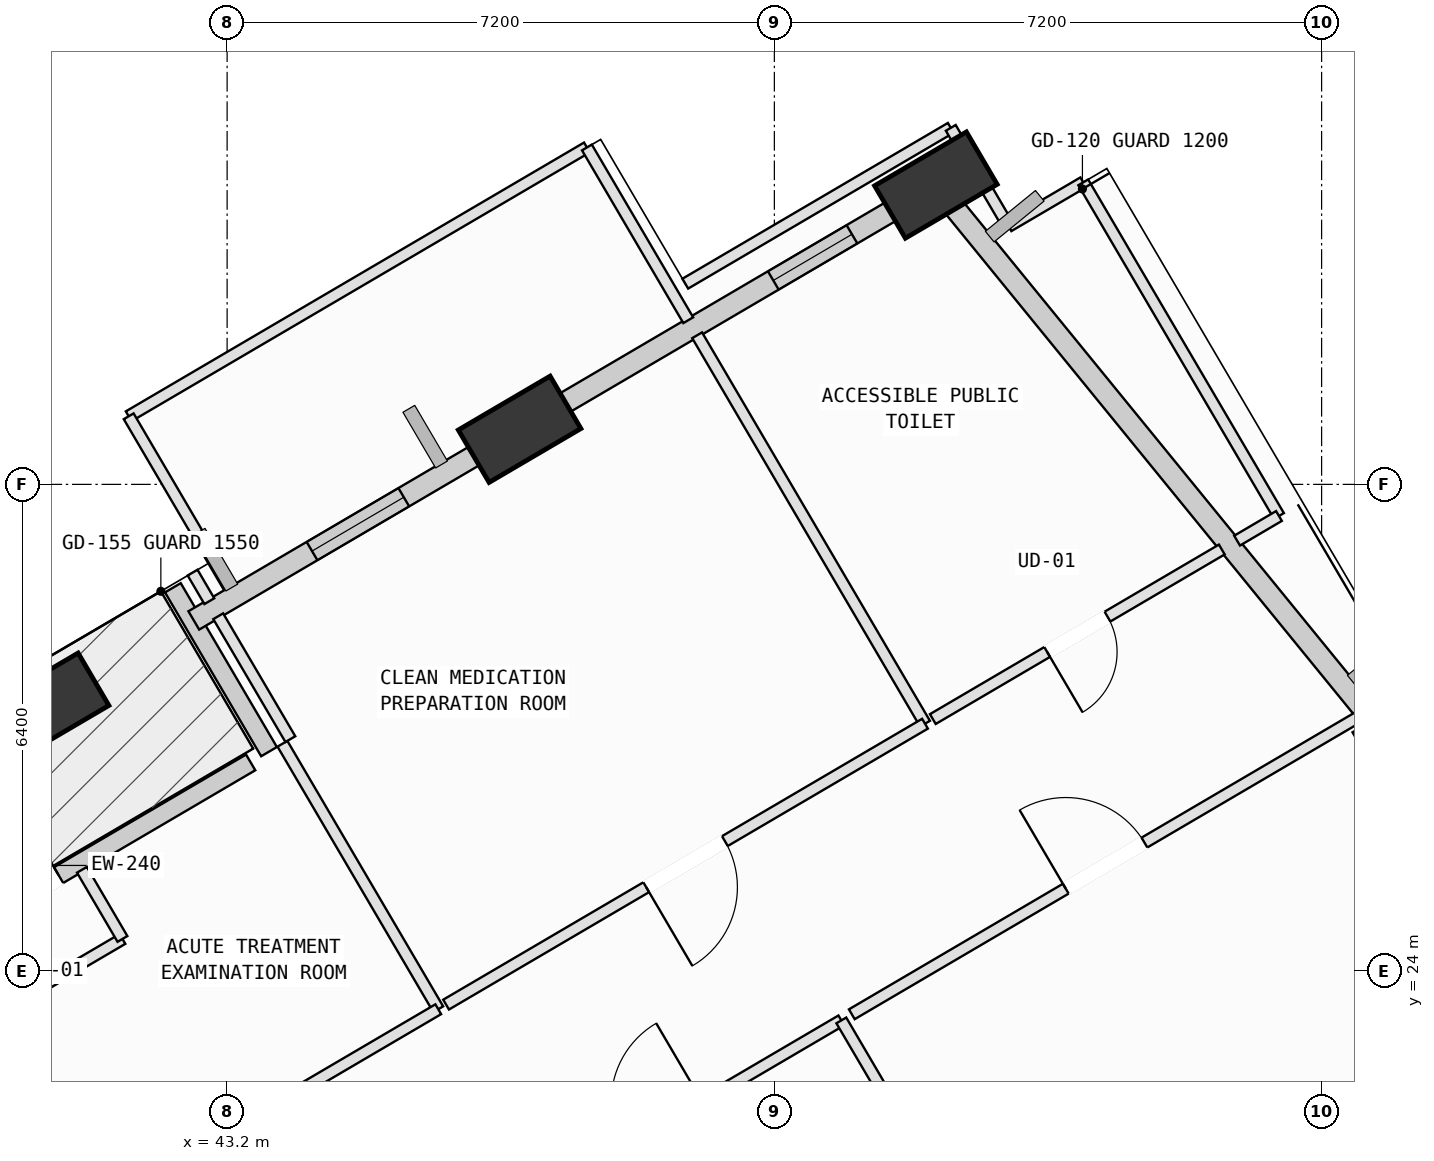
"""IFC4 building model, lengths in metres.
Left out: names, types, materials, properties, quantities, classifications, styles, units other than length and angle.
Written with IfcOpenShell. Run it as: python <this file> out.ifc"""

import sys

from ifc_helpers import new_model, si_unit, direction, frame, frame_2d, origin, origin_2d, place, context, subcontext, project, spatial, rectangle, extrude, element, fill, save


model = new_model("IFC4")
c1 = context("Model", 3, precision=1e-05, world=origin(), true_north=direction((0.0, 1.0)))
c2 = subcontext(c1, "Body", "Model", "MODEL_VIEW")
j1 = project(units=[si_unit("LENGTHUNIT", "METRE"), si_unit("PLANEANGLEUNIT", "RADIAN")], contexts=[c1])
p1 = place(None, origin())
s1 = spatial("IfcSite", under=j1, at=p1, CompositionType="ELEMENT")
p2 = place(p1, origin())
s2 = spatial("IfcBuilding", under=s1, at=p2, CompositionType="ELEMENT")
p3 = place(p2, frame((0.0, 0.0, 153.8)))
s3 = spatial("IfcBuildingStorey", under=s2, at=p3, CompositionType="ELEMENT", Elevation=153.8)
p4 = place(p3, frame((58.728, 26.731, 0.002), z_axis=(-0.008810255612, 0.103535693532, 0.994586717969), x_axis=(0.576946050037, -0.811850264044, 0.089623680566)))
e1 = element("IfcColumn", 1, at=p4, inside=s3, PredefinedType="COLUMN", context=c2, shape_type="SweptSolid", body=[
    extrude(rectangle(XDim=1.4, YDim=0.8, at=origin_2d()), origin(), (0.0, 0.0, 1.0), 4.018),
])
p5 = place(p3, frame((52.525, 34.338, 0.002), z_axis=(-0.039982884039, 0.077835781867, 0.996164123047), x_axis=(-0.536879122106, -0.842496331577, 0.044280238552)))
e2 = element("IfcColumn", 2, at=p5, inside=s3, PredefinedType="COLUMN", context=c2, shape_type="SweptSolid", body=[
    extrude(rectangle(XDim=1.4, YDim=0.8, at=origin_2d()), origin(), (0.0, 0.0, 1.0), 4.012),
])
p6 = place(p3, frame((47.048, 31.125, 0.002), z_axis=(-0.026646271569, 0.055426683881, 0.998107137999), x_axis=(-0.558510197986, -0.828913665731, 0.03112062836)))
e3 = element("IfcColumn", 3, at=p6, inside=s3, PredefinedType="COLUMN", context=c2, shape_type="SweptSolid", body=[
    extrude(rectangle(XDim=1.4, YDim=0.8, at=origin_2d()), origin(), (0.0, 0.0, 1.0), 4.004),
])
p7 = place(p3, frame((40.838, 27.481, 0.002), z_axis=(-0.011357121985, 0.029919299853, 0.999487794461), x_axis=(-0.626881403179, -0.778946373257, 0.016194256332)))
e4 = element("IfcColumn", 4, at=p7, inside=s3, PredefinedType="COLUMN", context=c2, shape_type="SweptSolid", body=[
    extrude(rectangle(XDim=1.4, YDim=0.8, at=origin_2d()), origin(), (0.0, 0.0, 1.0), 3.998),
])
p8 = place(p3, frame((37.507, 23.22, 0.0), z_axis=(0.0, 0.0, 1.0), x_axis=(0.862517965363, 0.50602644143, 0.0)))
e5 = element("IfcWall", 5, at=p8, inside=s3, PredefinedType="SOLIDWALL", context=c2, shape_type="SweptSolid", body=[
    extrude(rectangle(XDim=6.96, YDim=0.24, at=frame_2d((3.48, 0.0))), origin(), (0.0, 0.0, 1.0), 3.165),
])
p9 = place(p8, frame((2.93, 0.0, 0.0)))
e6 = element("IfcOpeningElement", 6, at=p9, cuts=e5, PredefinedType="OPENING", context=c2, shape_type="SweptSolid", body=[
    extrude(rectangle(XDim=1.1, YDim=2.15, at=frame_2d((0.55, 1.075))), frame((0.0, 0.13, 0.0), z_axis=(0.0, -1.0, 0.0), x_axis=(1.0, 0.0, 0.0)), (0.0, 0.0, 1.0), 0.26),
])
p10 = place(p3, frame((43.751, 26.883, 0.0), z_axis=(0.0, 0.0, 1.0), x_axis=(-0.506012674175, 0.862526042259, 0.0)))
e7 = element("IfcWall", 7, at=p10, inside=s3, PredefinedType="SOLIDWALL", context=c2, shape_type="SweptSolid", body=[
    extrude(rectangle(XDim=2.5, YDim=0.24, at=frame_2d((1.25, 0.0))), origin(), (0.0, 0.0, 1.0), 3.165),
])
p11 = place(p3, frame((52.729, 34.088, 0.0), z_axis=(0.0, 0.0, 1.0), x_axis=(0.631897979665, -0.775051574603, 0.0)))
e8 = element("IfcWall", 8, at=p11, inside=s3, PredefinedType="SOLIDWALL", context=c2, shape_type="SweptSolid", body=[
    extrude(rectangle(XDim=8.838, YDim=0.28, at=frame_2d((4.419, 0.0))), origin(), (0.0, 0.0, 1.0), 3.165),
])
p12 = place(p3, frame((47.472, 31.373, 0.0), z_axis=(0.0, 0.0, 1.0), x_axis=(0.862501509664, 0.50605448899, 0.0)))
e9 = element("IfcWall", 9, at=p12, inside=s3, PredefinedType="SOLIDWALL", context=c2, shape_type="SweptSolid", body=[
    extrude(rectangle(XDim=5.405, YDim=0.28, at=frame_2d((2.702, 0.0))), origin(), (0.0, 0.0, 1.0), 3.065),
])
p13 = place(p12, frame((3.379, 0.0, 0.75)))
e10 = element("IfcOpeningElement", 10, at=p13, cuts=e9, PredefinedType="OPENING", context=c2, shape_type="SweptSolid", body=[
    extrude(rectangle(XDim=1.2, YDim=1.75, at=frame_2d((0.6, 0.875))), frame((0.0, 0.15, 0.0), z_axis=(0.0, -1.0, 0.0), x_axis=(1.0, 0.0, 0.0)), (0.0, 0.0, 1.0), 0.3),
])
p14 = place(p3, frame((42.762, 28.61, 0.0), z_axis=(0.0, 0.0, 1.0), x_axis=(0.862502800913, 0.506052288224, 0.0)))
e11 = element("IfcWall", 11, at=p14, inside=s3, PredefinedType="SOLIDWALL", context=c2, shape_type="SweptSolid", body=[
    extrude(rectangle(XDim=4.499, YDim=0.28, at=frame_2d((2.25, 0.0))), origin(), (0.0, 0.0, 1.0), 3.145),
])
p15 = place(p14, frame((1.803, 0.0, 0.75)))
e12 = element("IfcOpeningElement", 12, at=p15, cuts=e11, PredefinedType="OPENING", context=c2, shape_type="SweptSolid", body=[
    extrude(rectangle(XDim=1.4, YDim=1.85, at=frame_2d((0.7, 0.925))), frame((0.0, 0.15, 0.0), z_axis=(0.0, -1.0, 0.0), x_axis=(1.0, 0.0, 0.0)), (0.0, 0.0, 1.0), 0.3),
])
p16 = place(p3, frame((46.589, 20.595, 0.0), z_axis=(0.0, 0.0, 1.0), x_axis=(0.862575050657, 0.505929127433, 0.0)))
e13 = element("IfcWall", 13, at=p16, inside=s3, PredefinedType="PARTITIONING", context=c2, shape_type="SweptSolid", body=[
    extrude(rectangle(XDim=5.439, YDim=0.15, at=frame_2d((2.72, 0.0))), origin(), (0.0, 0.0, 1.0), 3.065),
])
p17 = place(p16, frame((2.12, 0.0, 0.0)))
e14 = element("IfcOpeningElement", 14, at=p17, cuts=e13, PredefinedType="OPENING", context=c2, shape_type="SweptSolid", body=[
    extrude(rectangle(XDim=1.2, YDim=2.15, at=frame_2d((0.6, 1.075))), frame((0.0, 0.085, 0.0), z_axis=(0.0, -1.0, 0.0), x_axis=(1.0, 0.0, 0.0)), (0.0, 0.0, 1.0), 0.17),
])
p18 = place(p3, frame((51.281, 23.347, 0.0), z_axis=(0.0, 0.0, 1.0), x_axis=(0.506072235551, -0.862491097, 0.0)))
e15 = element("IfcWall", 15, at=p18, inside=s3, PredefinedType="PARTITIONING", context=c2, shape_type="SweptSolid", body=[
    extrude(rectangle(XDim=11.935, YDim=0.15, at=frame_2d((5.968, 0.0))), origin(), (0.0, 0.0, 1.0), 3.78),
])
p19 = place(p3, frame((51.419, 23.428, 0.0), z_axis=(0.0, 0.0, 1.0), x_axis=(0.862469746782, 0.506108620639, 0.0)))
e16 = element("IfcWall", 16, at=p19, inside=s3, PredefinedType="PARTITIONING", context=c2, shape_type="SweptSolid", body=[
    extrude(rectangle(XDim=7.728, YDim=0.15, at=frame_2d((3.864, 0.0))), origin(), (0.0, 0.0, 1.0), 3.065),
])
p20 = place(p19, frame((3.264, 0.0, 0.0)))
e17 = element("IfcOpeningElement", 17, at=p20, cuts=e16, PredefinedType="OPENING", context=c2, shape_type="SweptSolid", body=[
    extrude(rectangle(XDim=1.2, YDim=2.15, at=frame_2d((0.6, 1.075))), frame((0.0, 0.085, 0.0), z_axis=(0.0, -1.0, 0.0), x_axis=(1.0, 0.0, 0.0)), (0.0, 0.0, 1.0), 0.17),
])
p21 = place(p3, frame((40.357, 23.559, 0.0), z_axis=(0.0, 0.0, 1.0), x_axis=(0.86258341397, 0.505914868277, 0.0)))
e18 = element("IfcWall", 18, at=p21, inside=s3, PredefinedType="PARTITIONING", context=c2, shape_type="SweptSolid", body=[
    extrude(rectangle(XDim=1.7, YDim=0.15, at=frame_2d((0.85, 0.0))), origin(), (0.0, 0.0, 1.0), 3.415),
])
p22 = place(p3, frame((41.823, 24.419, 0.0), z_axis=(0.0, 0.0, 1.0), x_axis=(-0.505309547825, 0.862938155882, 0.0)))
e19 = element("IfcWall", 19, at=p22, inside=s3, PredefinedType="PARTITIONING", context=c2, shape_type="SweptSolid", body=[
    extrude(rectangle(XDim=1.055, YDim=0.15, at=frame_2d((0.527, 0.0))), origin(), (0.0, 0.0, 1.0), 3.78),
])
p23 = place(p3, frame((43.928, 26.987, 0.0), z_axis=(0.0, 0.0, 1.0), x_axis=(0.506147939122, -0.862446672973, 0.0)))
e20 = element("IfcWall", 20, at=p23, inside=s3, PredefinedType="PARTITIONING", context=c2, shape_type="SweptSolid", body=[
    extrude(rectangle(XDim=4.05, YDim=0.15, at=frame_2d((2.025, 0.0))), origin(), (0.0, 0.0, 1.0), 3.415),
])
p24 = place(p3, frame((45.978, 23.494, 0.0), z_axis=(0.0, 0.0, 1.0), x_axis=(-0.862551983002, -0.505968454175, 0.0)))
e21 = element("IfcWall", 21, at=p24, inside=s3, PredefinedType="PARTITIONING", context=c2, shape_type="SweptSolid", body=[
    extrude(rectangle(XDim=5.562, YDim=0.15, at=frame_2d((2.781, 0.0))), origin(), (0.0, 0.0, 1.0), 3.78),
])
p25 = place(p3, frame((41.905, 31.296, 0.0), z_axis=(0.0, 0.0, 1.0), x_axis=(0.862520840706, 0.506021540399, 0.0)))
e22 = element("IfcWall", 22, at=p25, inside=s3, PredefinedType="PARTITIONING", context=c2, shape_type="SweptSolid", body=[
    extrude(rectangle(XDim=6.99, YDim=0.15, at=frame_2d((3.495, 0.0))), origin(), (0.0, 0.0, 1.0), 3.78),
])
p26 = place(p3, frame((47.934, 34.833, 0.0), z_axis=(0.0, 0.0, 1.0), x_axis=(0.505885937908, -0.862600381305, 0.0)))
e23 = element("IfcWall", 23, at=p26, inside=s3, PredefinedType="PARTITIONING", context=c2, shape_type="SweptSolid", body=[
    extrude(rectangle(XDim=2.635, YDim=0.15, at=frame_2d((1.317, 0.0))), origin(), (0.0, 0.0, 1.0), 3.78),
])
p27 = place(p3, frame((49.384, 32.362, 0.0), z_axis=(0.0, 0.0, 1.0), x_axis=(0.505957393196, -0.862558471218, 0.0)))
e24 = element("IfcWall", 24, at=p27, inside=s3, PredefinedType="PARTITIONING", context=c2, shape_type="SweptSolid", body=[
    extrude(rectangle(XDim=5.926, YDim=0.15, at=frame_2d((2.963, 0.0))), origin(), (0.0, 0.0, 1.0), 3.78),
])
p28 = place(p3, frame((52.382, 27.251, 0.0), z_axis=(0.0, 0.0, 1.0), x_axis=(-0.862558161186, -0.50595792174, 0.0)))
e25 = element("IfcWall", 25, at=p28, inside=s3, PredefinedType="PARTITIONING", context=c2, shape_type="SweptSolid", body=[
    extrude(rectangle(XDim=7.305, YDim=0.15, at=frame_2d((3.652, 0.0))), origin(), (0.0, 0.0, 1.0), 3.78),
])
p29 = place(p28, frame((3.052, 0.0, 0.0)))
e26 = element("IfcOpeningElement", 26, at=p29, cuts=e25, PredefinedType="OPENING", context=c2, shape_type="SweptSolid", body=[
    extrude(rectangle(XDim=1.2, YDim=2.15, at=frame_2d((0.6, 1.075))), frame((0.0, 0.085, 0.0), z_axis=(0.0, -1.0, 0.0), x_axis=(1.0, 0.0, 0.0)), (0.0, 0.0, 1.0), 0.17),
])
p30 = place(p3, frame((44.032, 27.048, 0.0), z_axis=(0.0, 0.0, 1.0), x_axis=(-0.506160564265, 0.862439263475, 0.0)))
e27 = element("IfcWall", 27, at=p30, inside=s3, PredefinedType="PARTITIONING", context=c2, shape_type="SweptSolid", body=[
    extrude(rectangle(XDim=1.875, YDim=0.15, at=frame_2d((0.938, 0.0))), origin(), (0.0, 0.0, 1.0), 3.78),
])
p31 = place(p3, frame((42.966, 28.863, 0.0), z_axis=(0.0, 0.0, 1.0), x_axis=(-0.504985742668, 0.863127684472, 0.0)))
e28 = element("IfcWall", 28, at=p31, inside=s3, PredefinedType="PARTITIONING", context=c2, shape_type="SweptSolid", body=[
    extrude(rectangle(XDim=0.436, YDim=0.15, at=frame_2d((0.218, 0.0))), origin(), (0.0, 0.0, 1.0), 3.78),
])
p32 = place(p3, frame((43.215, 29.062, 0.0), z_axis=(0.0, 0.0, 1.0), x_axis=(-0.505874334541, 0.862607186182, 0.0)))
e29 = element("IfcWall", 29, at=p32, inside=s3, PredefinedType="PARTITIONING", context=c2, shape_type="SweptSolid", body=[
    extrude(rectangle(XDim=2.59, YDim=0.15, at=frame_2d((1.295, 0.0))), origin(), (0.0, 0.0, 1.0), 3.78),
])
p33 = place(p3, frame((49.228, 33.041, 0.0), z_axis=(0.0, 0.0, 1.0), x_axis=(0.862431229601, 0.506174252811, 0.0)))
e30 = element("IfcWall", 30, at=p33, inside=s3, PredefinedType="PARTITIONING", context=c2, shape_type="SweptSolid", body=[
    extrude(rectangle(XDim=4.05, YDim=0.15, at=frame_2d((2.025, 0.0))), origin(), (0.0, 0.0, 1.0), 3.065),
])
p34 = place(p3, frame((52.721, 35.091, 0.0), z_axis=(0.0, 0.0, 1.0), x_axis=(0.50597425282, -0.86254858152, 0.0)))
e31 = element("IfcWall", 31, at=p34, inside=s3, PredefinedType="PARTITIONING", context=c2, shape_type="SweptSolid", body=[
    extrude(rectangle(XDim=1.5, YDim=0.15, at=frame_2d((0.75, 0.0))), origin(), (0.0, 0.0, 1.0), 3.165),
])
p35 = place(p3, frame((53.48, 33.797, 0.0), z_axis=(0.0, 0.0, 1.0), x_axis=(0.862697970098, 0.505719499712, 0.0)))
e32 = element("IfcWall", 32, at=p35, inside=s3, PredefinedType="PARTITIONING", context=c2, shape_type="SweptSolid", body=[
    extrude(rectangle(XDim=1.141, YDim=0.15, at=frame_2d((0.57, 0.0))), origin(), (0.0, 0.0, 1.0), 3.78),
])
p36 = place(p3, frame((54.464, 34.374, 0.0), z_axis=(0.0, 0.0, 1.0), x_axis=(0.505927534005, -0.862575985254, 0.0)))
e33 = element("IfcWall", 33, at=p36, inside=s3, PredefinedType="PARTITIONING", context=c2, shape_type="SweptSolid", body=[
    extrude(rectangle(XDim=5.09, YDim=0.15, at=frame_2d((2.545, 0.0))), origin(), (0.0, 0.0, 1.0), 3.78),
])
p37 = place(p3, frame((57.039, 29.984, 0.0), z_axis=(0.0, 0.0, 1.0), x_axis=(-0.862042199655, -0.506836508171, 0.0)))
e34 = element("IfcWall", 34, at=p37, inside=s3, PredefinedType="PARTITIONING", context=c2, shape_type="SweptSolid", body=[
    extrude(rectangle(XDim=0.639, YDim=0.15, at=frame_2d((0.32, 0.0))), origin(), (0.0, 0.0, 1.0), 3.78),
])
p38 = place(p3, frame((56.287, 29.543, 0.0), z_axis=(0.0, 0.0, 1.0), x_axis=(-0.862480426049, -0.506090421449, 0.0)))
e35 = element("IfcWall", 35, at=p38, inside=s3, PredefinedType="PARTITIONING", context=c2, shape_type="SweptSolid", body=[
    extrude(rectangle(XDim=4.408, YDim=0.15, at=frame_2d((2.204, 0.0))), origin(), (0.0, 0.0, 1.0), 3.78),
])
p39 = place(p38, frame((1.744, 0.0, 0.0)))
e36 = element("IfcOpeningElement", 36, at=p39, cuts=e35, PredefinedType="OPENING", context=c2, shape_type="SweptSolid", body=[
    extrude(rectangle(XDim=0.92, YDim=2.1, at=frame_2d((0.46, 1.05))), frame((0.0, 0.085, 0.0), z_axis=(0.0, -1.0, 0.0), x_axis=(1.0, 0.0, 0.0)), (0.0, 0.0, 1.0), 0.17),
])
p40 = place(p9, origin())
e37 = element("IfcDoor", 37, at=p40, inside=s3, OperationType="SINGLE_SWING_RIGHT", PredefinedType="DOOR", context=c2, shape_type="SweptSolid", body=[
    extrude(rectangle(XDim=1.1, YDim=2.15, at=frame_2d((0.55, 1.075))), frame((0.0, 0.025, 0.0), z_axis=(0.0, -1.0, 0.0), x_axis=(1.0, 0.0, 0.0)), (0.0, 0.0, 1.0), 0.05),
])
fill(e6, e37)
p41 = place(p13, origin())
e38 = element("IfcWindow", 38, at=p41, inside=s3, PartitioningType="SINGLE_PANEL", PredefinedType="WINDOW", context=c2, shape_type="SweptSolid", body=[
    extrude(rectangle(XDim=1.2, YDim=1.75, at=frame_2d((0.6, 0.875))), frame((0.0, 0.03, 0.0), z_axis=(0.0, -1.0, 0.0), x_axis=(1.0, 0.0, 0.0)), (0.0, 0.0, 1.0), 0.06),
])
fill(e10, e38)
p42 = place(p15, origin())
e39 = element("IfcWindow", 39, at=p42, inside=s3, PartitioningType="SINGLE_PANEL", PredefinedType="WINDOW", context=c2, shape_type="SweptSolid", body=[
    extrude(rectangle(XDim=1.4, YDim=1.85, at=frame_2d((0.7, 0.925))), frame((0.0, 0.03, 0.0), z_axis=(0.0, -1.0, 0.0), x_axis=(1.0, 0.0, 0.0)), (0.0, 0.0, 1.0), 0.06),
])
fill(e12, e39)
p43 = place(p20, origin())
e40 = element("IfcDoor", 40, at=p43, inside=s3, OperationType="SINGLE_SWING_LEFT", PredefinedType="DOOR", context=c2, shape_type="SweptSolid", body=[
    extrude(rectangle(XDim=1.2, YDim=2.15, at=frame_2d((0.6, 1.075))), frame((0.0, 0.025, 0.0), z_axis=(0.0, -1.0, 0.0), x_axis=(1.0, 0.0, 0.0)), (0.0, 0.0, 1.0), 0.05),
])
fill(e17, e40)
p44 = place(p29, origin())
e41 = element("IfcDoor", 41, at=p44, inside=s3, OperationType="SINGLE_SWING_RIGHT", PredefinedType="DOOR", context=c2, shape_type="SweptSolid", body=[
    extrude(rectangle(XDim=1.2, YDim=2.15, at=frame_2d((0.6, 1.075))), frame((0.0, 0.025, 0.0), z_axis=(0.0, -1.0, 0.0), x_axis=(1.0, 0.0, 0.0)), (0.0, 0.0, 1.0), 0.05),
])
fill(e26, e41)
p45 = place(p39, origin())
e42 = element("IfcDoor", 42, at=p45, inside=s3, OperationType="SINGLE_SWING_RIGHT", PredefinedType="DOOR", context=c2, shape_type="SweptSolid", body=[
    extrude(rectangle(XDim=0.92, YDim=2.1, at=frame_2d((0.46, 1.05))), frame((0.0, 0.025, 0.0), z_axis=(0.0, -1.0, 0.0), x_axis=(1.0, 0.0, 0.0)), (0.0, 0.0, 1.0), 0.05),
])
fill(e36, e42)
save(model, sys.argv[1])
